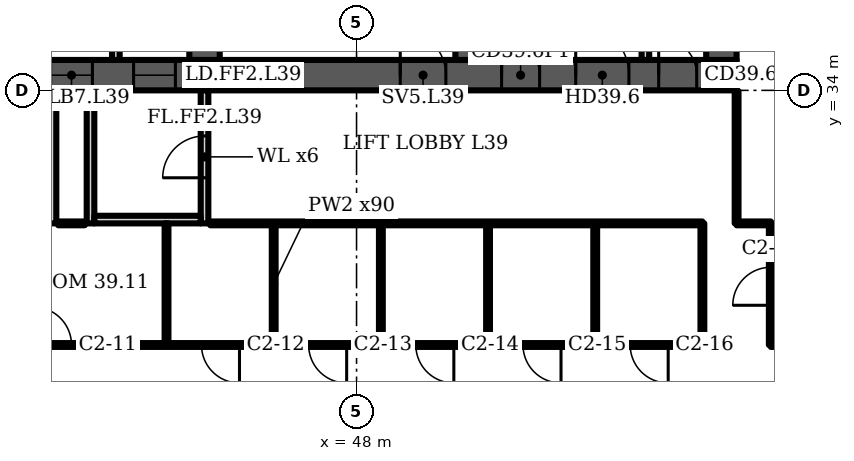
"""IFC4 building model, lengths in metres.
Left out: names, types, materials, properties, quantities, classifications, styles, units other than length and angle.
Written with IfcOpenShell. Run it as: python <this file> out.ifc"""

import sys

from ifc_helpers import new_model, si_unit, direction, frame, frame_2d, origin, place, context, subcontext, project, spatial, polyline, rectangle, outline, extrude, element, fill, save


model = new_model("IFC4")
c1 = context("Model", 3, precision=1e-05, world=origin(), true_north=direction((0.0, 1.0)))
c2 = subcontext(c1, "Body", "Model", "MODEL_VIEW")
j1 = project(units=[si_unit("LENGTHUNIT", "METRE"), si_unit("PLANEANGLEUNIT", "RADIAN")], contexts=[c1])
p1 = place(None, origin())
s1 = spatial("IfcSite", under=j1, at=p1, CompositionType="ELEMENT")
p2 = place(p1, origin())
s2 = spatial("IfcBuilding", under=s1, at=p2, CompositionType="ELEMENT")
p3 = place(p2, frame((0.0, 0.0, 162.7)))
s3 = spatial("IfcBuildingStorey", under=s2, at=p3, CompositionType="ELEMENT", Elevation=162.7)
p4 = place(p3, frame((16.0, 34.4, 0.0), z_axis=(0.0, 0.0, 1.0), x_axis=(1.0, 0.0, 0.0)))
e1 = element("IfcWall", 1, at=p4, inside=s3, PredefinedType="SHEAR", context=c2, shape_type="SweptSolid", body=[
    extrude(rectangle(XDim=42.0, YDim=0.8, at=frame_2d((21.0, 0.0))), origin(), (0.0, 0.0, 1.0), 3.6),
])
p5 = place(p4, frame((1.75, 0.0, 0.0)))
e2 = element("IfcOpeningElement", 2, at=p5, cuts=e1, PredefinedType="OPENING", context=c2, shape_type="SweptSolid", body=[
    extrude(rectangle(XDim=1.0, YDim=2.1, at=frame_2d((0.5, 1.05))), frame((0.0, 0.41, 0.0), z_axis=(0.0, -1.0, 0.0), x_axis=(1.0, 0.0, 0.0)), (0.0, 0.0, 1.0), 0.82),
])
p6 = place(p4, frame((4.65, 0.0, 0.0)))
e3 = element("IfcOpeningElement", 3, at=p6, cuts=e1, PredefinedType="OPENING", context=c2, shape_type="SweptSolid", body=[
    extrude(rectangle(XDim=1.0, YDim=2.1, at=frame_2d((0.5, 1.05))), frame((0.0, 0.41, 0.0), z_axis=(0.0, -1.0, 0.0), x_axis=(1.0, 0.0, 0.0)), (0.0, 0.0, 1.0), 0.82),
])
p7 = place(p4, frame((7.65, 0.0, 0.0)))
e4 = element("IfcOpeningElement", 4, at=p7, cuts=e1, PredefinedType="OPENING", context=c2, shape_type="SweptSolid", body=[
    extrude(rectangle(XDim=1.2, YDim=2.1, at=frame_2d((0.6, 1.05))), frame((0.0, 0.41, 0.0), z_axis=(0.0, -1.0, 0.0), x_axis=(1.0, 0.0, 0.0)), (0.0, 0.0, 1.0), 0.82),
])
p8 = place(p4, frame((14.767, 0.0, 0.0)))
e5 = element("IfcOpeningElement", 5, at=p8, cuts=e1, PredefinedType="OPENING", context=c2, shape_type="SweptSolid", body=[
    extrude(rectangle(XDim=1.1, YDim=2.1, at=frame_2d((0.55, 1.05))), frame((0.0, 0.41, 0.0), z_axis=(0.0, -1.0, 0.0), x_axis=(1.0, 0.0, 0.0)), (0.0, 0.0, 1.0), 0.82),
])
p9 = place(p4, frame((19.133, 0.0, 0.0)))
e6 = element("IfcOpeningElement", 6, at=p9, cuts=e1, PredefinedType="OPENING", context=c2, shape_type="SweptSolid", body=[
    extrude(rectangle(XDim=1.1, YDim=2.1, at=frame_2d((0.55, 1.05))), frame((0.0, 0.41, 0.0), z_axis=(0.0, -1.0, 0.0), x_axis=(1.0, 0.0, 0.0)), (0.0, 0.0, 1.0), 0.82),
])
p10 = place(p4, frame((16.8, 0.0, 0.0)))
e7 = element("IfcOpeningElement", 7, at=p10, cuts=e1, PredefinedType="OPENING", context=c2, shape_type="SweptSolid", body=[
    extrude(rectangle(XDim=1.4, YDim=2.1, at=frame_2d((0.7, 1.05))), frame((0.0, 0.41, 0.0), z_axis=(0.0, -1.0, 0.0), x_axis=(1.0, 0.0, 0.0)), (0.0, 0.0, 1.0), 0.82),
])
p11 = place(p4, frame((21.767, 0.0, 0.0)))
e8 = element("IfcOpeningElement", 8, at=p11, cuts=e1, PredefinedType="OPENING", context=c2, shape_type="SweptSolid", body=[
    extrude(rectangle(XDim=1.1, YDim=2.1, at=frame_2d((0.55, 1.05))), frame((0.0, 0.41, 0.0), z_axis=(0.0, -1.0, 0.0), x_axis=(1.0, 0.0, 0.0)), (0.0, 0.0, 1.0), 0.82),
])
p12 = place(p4, frame((23.95, 0.0, 0.0)))
e9 = element("IfcOpeningElement", 9, at=p12, cuts=e1, PredefinedType="OPENING", context=c2, shape_type="SweptSolid", body=[
    extrude(rectangle(XDim=1.1, YDim=2.1, at=frame_2d((0.55, 1.05))), frame((0.0, 0.41, 0.0), z_axis=(0.0, -1.0, 0.0), x_axis=(1.0, 0.0, 0.0)), (0.0, 0.0, 1.0), 0.82),
])
p13 = place(p4, frame((26.133, 0.0, 0.0)))
e10 = element("IfcOpeningElement", 10, at=p13, cuts=e1, PredefinedType="OPENING", context=c2, shape_type="SweptSolid", body=[
    extrude(rectangle(XDim=1.1, YDim=2.1, at=frame_2d((0.55, 1.05))), frame((0.0, 0.41, 0.0), z_axis=(0.0, -1.0, 0.0), x_axis=(1.0, 0.0, 0.0)), (0.0, 0.0, 1.0), 0.82),
])
p14 = place(p4, frame((33.15, 0.0, 0.0)))
e11 = element("IfcOpeningElement", 11, at=p14, cuts=e1, PredefinedType="OPENING", context=c2, shape_type="SweptSolid", body=[
    extrude(rectangle(XDim=1.2, YDim=2.1, at=frame_2d((0.6, 1.05))), frame((0.0, 0.41, 0.0), z_axis=(0.0, -1.0, 0.0), x_axis=(1.0, 0.0, 0.0)), (0.0, 0.0, 1.0), 0.82),
])
p15 = place(p4, frame((35.817, 0.0, 0.0)))
e12 = element("IfcOpeningElement", 12, at=p15, cuts=e1, PredefinedType="OPENING", context=c2, shape_type="SweptSolid", body=[
    extrude(rectangle(XDim=1.0, YDim=2.1, at=frame_2d((0.5, 1.05))), frame((0.0, 0.41, 0.0), z_axis=(0.0, -1.0, 0.0), x_axis=(1.0, 0.0, 0.0)), (0.0, 0.0, 1.0), 0.82),
])
p16 = place(p4, frame((39.95, 0.0, 0.0)))
e13 = element("IfcOpeningElement", 13, at=p16, cuts=e1, PredefinedType="OPENING", context=c2, shape_type="SweptSolid", body=[
    extrude(rectangle(XDim=1.0, YDim=2.1, at=frame_2d((0.5, 1.05))), frame((0.0, 0.41, 0.0), z_axis=(0.0, -1.0, 0.0), x_axis=(1.0, 0.0, 0.0)), (0.0, 0.0, 1.0), 0.82),
])
p17 = place(p4, frame((37.767, 0.0, 0.0)))
e14 = element("IfcOpeningElement", 14, at=p17, cuts=e1, PredefinedType="OPENING", context=c2, shape_type="SweptSolid", body=[
    extrude(rectangle(XDim=1.4, YDim=2.1, at=frame_2d((0.7, 1.05))), frame((0.0, 0.41, 0.0), z_axis=(0.0, -1.0, 0.0), x_axis=(1.0, 0.0, 0.0)), (0.0, 0.0, 1.0), 0.82),
])
p18 = place(p3, frame((44.0, 34.8, 0.0), z_axis=(0.0, 0.0, 1.0), x_axis=(0.0, 1.0, 0.0)))
e15 = element("IfcWall", 15, at=p18, inside=s3, PredefinedType="SHEAR", context=c2, shape_type="SweptSolid", body=[
    extrude(rectangle(XDim=14.374, YDim=0.8, at=frame_2d((7.187, 0.0))), origin(), (0.0, 0.0, 1.0), 3.6),
])
p19 = place(p18, frame((11.312, 0.0, 0.0)))
e16 = element("IfcOpeningElement", 16, at=p19, cuts=e15, PredefinedType="OPENING", context=c2, shape_type="SweptSolid", body=[
    extrude(rectangle(XDim=1.0, YDim=2.1, at=frame_2d((0.5, 1.05))), frame((0.0, 0.41, 0.0), z_axis=(0.0, -1.0, 0.0), x_axis=(1.0, 0.0, 0.0)), (0.0, 0.0, 1.0), 0.82),
])
p20 = place(p18, frame((3.6, 0.0, 0.0)))
e17 = element("IfcOpeningElement", 17, at=p20, cuts=e15, PredefinedType="OPENING", context=c2, shape_type="SweptSolid", body=[
    extrude(rectangle(XDim=1.1, YDim=2.1, at=frame_2d((0.55, 1.05))), frame((0.0, 0.41, 0.0), z_axis=(0.0, -1.0, 0.0), x_axis=(1.0, 0.0, 0.0)), (0.0, 0.0, 1.0), 0.82),
])
p21 = place(p3, frame((51.0, 34.8, 0.0), z_axis=(0.0, 0.0, 1.0), x_axis=(0.0, 1.0, 0.0)))
e18 = element("IfcWall", 18, at=p21, inside=s3, PredefinedType="SHEAR", context=c2, shape_type="SweptSolid", body=[
    extrude(rectangle(XDim=13.762, YDim=0.8, at=frame_2d((6.881, 0.0))), origin(), (0.0, 0.0, 1.0), 3.6),
])
p22 = place(p21, frame((3.6, 0.0, 0.0)))
e19 = element("IfcOpeningElement", 19, at=p22, cuts=e18, PredefinedType="OPENING", context=c2, shape_type="SweptSolid", body=[
    extrude(rectangle(XDim=1.1, YDim=2.1, at=frame_2d((0.55, 1.05))), frame((0.0, 0.41, 0.0), z_axis=(0.0, -1.0, 0.0), x_axis=(1.0, 0.0, 0.0)), (0.0, 0.0, 1.0), 0.82),
])
p23 = place(p3, frame((57.6, 34.8, 0.0), z_axis=(0.0, 0.0, 1.0), x_axis=(0.0, 1.0, 0.0)))
e20 = element("IfcWall", 20, at=p23, inside=s3, PredefinedType="SHEAR", context=c2, shape_type="SweptSolid", body=[
    extrude(rectangle(XDim=13.184, YDim=0.8, at=frame_2d((6.592, 0.0))), origin(), (0.0, 0.0, 1.0), 3.6),
])
p24 = place(p3, frame((0.0, 0.0, -0.0)))
e21 = element("IfcWall", 21, at=p24, inside=s3, PredefinedType="PARTITIONING", context=c2, shape_type="SweptSolid", body=[
    extrude(outline(polyline([(41.567, 37.1), (39.433, 37.1), (39.433, 34.8), (39.233, 34.8), (39.233, 37.65), (37.4, 37.65), (37.4, 37.85), (39.233, 37.85), (39.433, 37.85), (39.433, 37.3), (41.567, 37.3), (41.567, 37.55), (41.767, 37.55), (43.6, 37.55), (43.6, 37.35), (41.767, 37.35), (41.767, 34.8), (41.567, 34.8), (41.567, 37.1)])), origin(), (0.0, 0.0, 1.0), 3.2),
])
p25 = place(p3, frame((0.0, 0.0, -0.0)))
e22 = element("IfcWall", 22, at=p25, inside=s3, PredefinedType="PARTITIONING", context=c2, shape_type="SweptSolid", body=[
    extrude(outline(polyline([(53.233, 34.8), (53.233, 37.3), (53.433, 37.3), (53.433, 34.8), (53.233, 34.8)])), origin(), (0.0, 0.0, 1.0), 3.2),
])
p26 = place(p3, frame((0.0, 0.0, -0.0)))
e23 = element("IfcWall", 23, at=p26, inside=s3, PredefinedType="PARTITIONING", context=c2, shape_type="SweptSolid", body=[
    extrude(outline(polyline([(55.5, 34.8), (55.5, 37.3), (55.7, 37.3), (55.7, 34.8), (55.5, 34.8)])), origin(), (0.0, 0.0, 1.0), 3.2),
])
for number, where, z_axis, x_axis in (
    (24, (40.0, 30.5, 0.0), (0.0, 0.0, 1.0), (0.0, 1.0, 0.0)),
    (25, (41.0, 30.5, 0.0), (0.0, 0.0, 1.0), (0.0, 1.0, 0.0)),
):
    element("IfcWall", number, at=place(p3, frame(where, z_axis=z_axis, x_axis=x_axis)), inside=s3, PredefinedType="PARTITIONING", context=c2, shape_type="SweptSolid", body=[
        extrude(rectangle(XDim=3.5, YDim=0.2, at=frame_2d((1.75, 0.0))), origin(), (0.0, 0.0, 1.0), 3.2),
    ])
p27 = place(p3, frame((44.0, 30.5, 0.0), z_axis=(0.0, 0.0, 1.0), x_axis=(0.0, 1.0, 0.0)))
e26 = element("IfcWall", 26, at=p27, inside=s3, PredefinedType="PARTITIONING", context=c2, shape_type="SweptSolid", body=[
    extrude(rectangle(XDim=3.5, YDim=0.2, at=frame_2d((1.75, 0.0))), origin(), (0.0, 0.0, 1.0), 3.2),
])
p28 = place(p27, frame((1.2, 0.0, 0.0)))
e27 = element("IfcOpeningElement", 27, at=p28, cuts=e26, PredefinedType="OPENING", context=c2, shape_type="SweptSolid", body=[
    extrude(rectangle(XDim=1.1, YDim=2.1, at=frame_2d((0.55, 1.05))), frame((0.0, 0.11, 0.0), z_axis=(0.0, -1.0, 0.0), x_axis=(1.0, 0.0, 0.0)), (0.0, 0.0, 1.0), 0.22),
])
p29 = place(p3, frame((41.1, 30.6, 0.0), z_axis=(0.0, 0.0, 1.0), x_axis=(1.0, 0.0, 0.0)))
e28 = element("IfcWall", 28, at=p29, inside=s3, PredefinedType="PARTITIONING", context=c2, shape_type="SweptSolid", body=[
    extrude(rectangle(XDim=2.8, YDim=0.2, at=frame_2d((1.4, 0.0))), origin(), (0.0, 0.0, 1.0), 3.2),
])
p30 = place(p3, frame((23.2, 27.3, 0.0), z_axis=(0.0, 0.0, 1.0), x_axis=(1.0, 0.0, 0.0)))
e29 = element("IfcWall", 29, at=p30, inside=s3, PredefinedType="PARTITIONING", context=c2, shape_type="SweptSolid", body=[
    extrude(rectangle(XDim=33.9, YDim=0.1, at=frame_2d((16.95, 0.0))), origin(), (0.0, 0.0, 1.0), 3.2),
])
p31 = place(p30, frame((16.3, 0.0, 0.0)))
e30 = element("IfcOpeningElement", 30, at=p31, cuts=e29, PredefinedType="OPENING", context=c2, shape_type="SweptSolid", body=[
    extrude(rectangle(XDim=1.0, YDim=2.1, at=frame_2d((0.5, 1.05))), frame((0.0, 0.06, 0.0), z_axis=(0.0, -1.0, 0.0), x_axis=(1.0, 0.0, 0.0)), (0.0, 0.0, 1.0), 0.12),
])
p32 = place(p30, frame((20.72, 0.0, 0.0)))
e31 = element("IfcOpeningElement", 31, at=p32, cuts=e29, PredefinedType="OPENING", context=c2, shape_type="SweptSolid", body=[
    extrude(rectangle(XDim=1.0, YDim=2.1, at=frame_2d((0.5, 1.05))), frame((0.0, 0.06, 0.0), z_axis=(0.0, -1.0, 0.0), x_axis=(1.0, 0.0, 0.0)), (0.0, 0.0, 1.0), 0.12),
])
p33 = place(p30, frame((23.54, 0.0, 0.0)))
e32 = element("IfcOpeningElement", 32, at=p33, cuts=e29, PredefinedType="OPENING", context=c2, shape_type="SweptSolid", body=[
    extrude(rectangle(XDim=1.0, YDim=2.1, at=frame_2d((0.5, 1.05))), frame((0.0, 0.06, 0.0), z_axis=(0.0, -1.0, 0.0), x_axis=(1.0, 0.0, 0.0)), (0.0, 0.0, 1.0), 0.12),
])
p34 = place(p30, frame((26.36, 0.0, 0.0)))
e33 = element("IfcOpeningElement", 33, at=p34, cuts=e29, PredefinedType="OPENING", context=c2, shape_type="SweptSolid", body=[
    extrude(rectangle(XDim=1.0, YDim=2.1, at=frame_2d((0.5, 1.05))), frame((0.0, 0.06, 0.0), z_axis=(0.0, -1.0, 0.0), x_axis=(1.0, 0.0, 0.0)), (0.0, 0.0, 1.0), 0.12),
])
p35 = place(p30, frame((29.18, 0.0, 0.0)))
e34 = element("IfcOpeningElement", 34, at=p35, cuts=e29, PredefinedType="OPENING", context=c2, shape_type="SweptSolid", body=[
    extrude(rectangle(XDim=1.0, YDim=2.1, at=frame_2d((0.5, 1.05))), frame((0.0, 0.06, 0.0), z_axis=(0.0, -1.0, 0.0), x_axis=(1.0, 0.0, 0.0)), (0.0, 0.0, 1.0), 0.12),
])
p36 = place(p30, frame((32.0, 0.0, 0.0)))
e35 = element("IfcOpeningElement", 35, at=p36, cuts=e29, PredefinedType="OPENING", context=c2, shape_type="SweptSolid", body=[
    extrude(rectangle(XDim=1.0, YDim=2.1, at=frame_2d((0.5, 1.05))), frame((0.0, 0.06, 0.0), z_axis=(0.0, -1.0, 0.0), x_axis=(1.0, 0.0, 0.0)), (0.0, 0.0, 1.0), 0.12),
])
for number, where, z_axis, x_axis in (
    (36, (43.0, 27.3, 0.0), (0.0, 0.0, 1.0), (0.0, 1.0, 0.0)),
    (37, (45.82, 27.3, 0.0), (0.0, 0.0, 1.0), (0.0, 1.0, 0.0)),
    (38, (48.64, 27.3, 0.0), (0.0, 0.0, 1.0), (0.0, 1.0, 0.0)),
    (39, (51.46, 27.3, 0.0), (0.0, 0.0, 1.0), (0.0, 1.0, 0.0)),
    (40, (54.28, 27.3, 0.0), (0.0, 0.0, 1.0), (0.0, 1.0, 0.0)),
    (41, (57.1, 27.3, 0.0), (0.0, 0.0, 1.0), (0.0, 1.0, 0.0)),
):
    element("IfcWall", number, at=place(p3, frame(where, z_axis=z_axis, x_axis=x_axis)), inside=s3, PredefinedType="PARTITIONING", context=c2, shape_type="SweptSolid", body=[
        extrude(rectangle(XDim=3.2, YDim=0.1, at=frame_2d((1.6, 0.0))), origin(), (0.0, 0.0, 1.0), 3.2),
    ])
p37 = place(p3, frame((58.0, 30.5, 0.0), z_axis=(0.0, 0.0, 1.0), x_axis=(0.0, 1.0, 0.0)))
e42 = element("IfcWall", 42, at=p37, inside=s3, PredefinedType="PARTITIONING", context=c2, shape_type="SweptSolid", body=[
    extrude(rectangle(XDim=3.48, YDim=0.1, at=frame_2d((1.74, 0.0))), origin(), (0.0, 0.0, 1.0), 3.2),
])
p38 = place(p3, frame((58.0, 30.5, 0.0), z_axis=(0.0, 0.0, 1.0), x_axis=(1.0, 0.0, 0.0)))
e43 = element("IfcWall", 43, at=p38, inside=s3, PredefinedType="PARTITIONING", context=c2, shape_type="SweptSolid", body=[
    extrude(rectangle(XDim=0.9, YDim=0.1, at=frame_2d((0.45, 0.0))), origin(), (0.0, 0.0, 1.0), 3.2),
])
p39 = place(p3, frame((58.9, 27.3, 0.0), z_axis=(0.0, 0.0, 1.0), x_axis=(0.0, 1.0, 0.0)))
e44 = element("IfcWall", 44, at=p39, inside=s3, PredefinedType="PARTITIONING", context=c2, shape_type="SweptSolid", body=[
    extrude(rectangle(XDim=3.2, YDim=0.1, at=frame_2d((1.6, 0.0))), origin(), (0.0, 0.0, 1.0), 3.2),
])
p40 = place(p39, frame((1.045, 0.0, 0.0)))
e45 = element("IfcOpeningElement", 45, at=p40, cuts=e44, PredefinedType="OPENING", context=c2, shape_type="SweptSolid", body=[
    extrude(rectangle(XDim=1.0, YDim=2.1, at=frame_2d((0.5, 1.05))), frame((0.0, 0.06, 0.0), z_axis=(0.0, -1.0, 0.0), x_axis=(1.0, 0.0, 0.0)), (0.0, 0.0, 1.0), 0.12),
])
p41 = place(p3, frame((58.9, 27.3, 0.0), z_axis=(0.0, 0.0, 1.0), x_axis=(1.0, 0.0, 0.0)))
e46 = element("IfcWall", 46, at=p41, inside=s3, PredefinedType="PARTITIONING", context=c2, shape_type="SweptSolid", body=[
    extrude(rectangle(XDim=4.555, YDim=0.1, at=frame_2d((2.278, 0.0))), origin(), (0.0, 0.0, 1.0), 3.2),
])
p42 = place(p3, frame((40.15, 30.5, 0.0), z_axis=(0.0, 0.0, 1.0), x_axis=(1.0, 0.0, 0.0)))
e47 = element("IfcWall", 47, at=p42, inside=s3, PredefinedType="PARTITIONING", context=c2, shape_type="SweptSolid", body=[
    extrude(rectangle(XDim=0.7, YDim=0.1, at=frame_2d((0.35, 0.0))), origin(), (0.0, 0.0, 1.0), 3.2),
])
p43 = place(p3, frame((44.15, 30.5, 0.0), z_axis=(0.0, 0.0, 1.0), x_axis=(1.0, 0.0, 0.0)))
e48 = element("IfcWall", 48, at=p43, inside=s3, PredefinedType="PARTITIONING", context=c2, shape_type="SweptSolid", body=[
    extrude(rectangle(XDim=12.95, YDim=0.1, at=frame_2d((6.475, 0.0))), origin(), (0.0, 0.0, 1.0), 3.2),
])
p44 = place(p12, origin())
e49 = element("IfcDoor", 49, at=p44, inside=s3, OperationType="DOUBLE_DOOR_SLIDING", PredefinedType="DOOR", context=c2, shape_type="SweptSolid", body=[
    extrude(rectangle(XDim=1.1, YDim=2.1, at=frame_2d((0.55, 1.05))), frame((0.0, 0.025, 0.0), z_axis=(0.0, -1.0, 0.0), x_axis=(1.0, 0.0, 0.0)), (0.0, 0.0, 1.0), 0.05),
])
fill(e9, e49)
p45 = place(p13, origin())
e50 = element("IfcDoor", 50, at=p45, inside=s3, OperationType="DOUBLE_DOOR_SLIDING", PredefinedType="DOOR", context=c2, shape_type="SweptSolid", body=[
    extrude(rectangle(XDim=1.1, YDim=2.1, at=frame_2d((0.55, 1.05))), frame((0.0, 0.025, 0.0), z_axis=(0.0, -1.0, 0.0), x_axis=(1.0, 0.0, 0.0)), (0.0, 0.0, 1.0), 0.05),
])
fill(e10, e50)
p46 = place(p14, origin())
e51 = element("IfcDoor", 51, at=p46, inside=s3, OperationType="SINGLE_SWING_LEFT", PredefinedType="DOOR", context=c2, shape_type="SweptSolid", body=[
    extrude(rectangle(XDim=1.2, YDim=2.1, at=frame_2d((0.6, 1.05))), frame((0.0, 0.025, 0.0), z_axis=(0.0, -1.0, 0.0), x_axis=(1.0, 0.0, 0.0)), (0.0, 0.0, 1.0), 0.05),
])
fill(e11, e51)
p47 = place(p15, origin())
e52 = element("IfcDoor", 52, at=p47, inside=s3, OperationType="SINGLE_SWING_LEFT", PredefinedType="DOOR", context=c2, shape_type="SweptSolid", body=[
    extrude(rectangle(XDim=1.0, YDim=2.1, at=frame_2d((0.5, 1.05))), frame((0.0, 0.4, 0.0), z_axis=(0.0, -1.0, 0.0), x_axis=(1.0, 0.0, 0.0)), (0.0, 0.0, 1.0), 0.8),
])
fill(e12, e52)
p48 = place(p16, origin())
e53 = element("IfcDoor", 53, at=p48, inside=s3, OperationType="SINGLE_SWING_LEFT", PredefinedType="DOOR", context=c2, shape_type="SweptSolid", body=[
    extrude(rectangle(XDim=1.0, YDim=2.1, at=frame_2d((0.5, 1.05))), frame((0.0, 0.4, 0.0), z_axis=(0.0, -1.0, 0.0), x_axis=(1.0, 0.0, 0.0)), (0.0, 0.0, 1.0), 0.8),
])
fill(e13, e53)
p49 = place(p17, origin())
e54 = element("IfcDoor", 54, at=p49, inside=s3, OperationType="DOUBLE_DOOR_SINGLE_SWING", PredefinedType="DOOR", context=c2, shape_type="SweptSolid", body=[
    extrude(rectangle(XDim=1.4, YDim=2.1, at=frame_2d((0.7, 1.05))), frame((0.0, 0.025, 0.0), z_axis=(0.0, -1.0, 0.0), x_axis=(1.0, 0.0, 0.0)), (0.0, 0.0, 1.0), 0.05),
])
fill(e14, e54)
p50 = place(p28, origin())
e55 = element("IfcDoor", 55, at=p50, inside=s3, OperationType="SINGLE_SWING_LEFT", PredefinedType="DOOR", context=c2, shape_type="SweptSolid", body=[
    extrude(rectangle(XDim=1.1, YDim=2.1, at=frame_2d((0.55, 1.05))), frame((0.0, 0.025, 0.0), z_axis=(0.0, -1.0, 0.0), x_axis=(1.0, 0.0, 0.0)), (0.0, 0.0, 1.0), 0.05),
])
fill(e27, e55)
p51 = place(p31, origin())
e56 = element("IfcDoor", 56, at=p51, inside=s3, OperationType="SINGLE_SWING_LEFT", PredefinedType="DOOR", context=c2, shape_type="SweptSolid", body=[
    extrude(rectangle(XDim=1.0, YDim=2.1, at=frame_2d((0.5, 1.05))), frame((0.0, 0.025, 0.0), z_axis=(0.0, -1.0, 0.0), x_axis=(1.0, 0.0, 0.0)), (0.0, 0.0, 1.0), 0.05),
])
fill(e30, e56)
p52 = place(p32, origin())
e57 = element("IfcDoor", 57, at=p52, inside=s3, OperationType="SINGLE_SWING_RIGHT", PredefinedType="DOOR", context=c2, shape_type="SweptSolid", body=[
    extrude(rectangle(XDim=1.0, YDim=2.1, at=frame_2d((0.5, 1.05))), frame((0.0, 0.025, 0.0), z_axis=(0.0, -1.0, 0.0), x_axis=(1.0, 0.0, 0.0)), (0.0, 0.0, 1.0), 0.05),
])
fill(e31, e57)
p53 = place(p33, origin())
e58 = element("IfcDoor", 58, at=p53, inside=s3, OperationType="SINGLE_SWING_RIGHT", PredefinedType="DOOR", context=c2, shape_type="SweptSolid", body=[
    extrude(rectangle(XDim=1.0, YDim=2.1, at=frame_2d((0.5, 1.05))), frame((0.0, 0.025, 0.0), z_axis=(0.0, -1.0, 0.0), x_axis=(1.0, 0.0, 0.0)), (0.0, 0.0, 1.0), 0.05),
])
fill(e32, e58)
p54 = place(p34, origin())
e59 = element("IfcDoor", 59, at=p54, inside=s3, OperationType="SINGLE_SWING_RIGHT", PredefinedType="DOOR", context=c2, shape_type="SweptSolid", body=[
    extrude(rectangle(XDim=1.0, YDim=2.1, at=frame_2d((0.5, 1.05))), frame((0.0, 0.025, 0.0), z_axis=(0.0, -1.0, 0.0), x_axis=(1.0, 0.0, 0.0)), (0.0, 0.0, 1.0), 0.05),
])
fill(e33, e59)
p55 = place(p35, origin())
e60 = element("IfcDoor", 60, at=p55, inside=s3, OperationType="SINGLE_SWING_RIGHT", PredefinedType="DOOR", context=c2, shape_type="SweptSolid", body=[
    extrude(rectangle(XDim=1.0, YDim=2.1, at=frame_2d((0.5, 1.05))), frame((0.0, 0.025, 0.0), z_axis=(0.0, -1.0, 0.0), x_axis=(1.0, 0.0, 0.0)), (0.0, 0.0, 1.0), 0.05),
])
fill(e34, e60)
p56 = place(p36, origin())
e61 = element("IfcDoor", 61, at=p56, inside=s3, OperationType="SINGLE_SWING_RIGHT", PredefinedType="DOOR", context=c2, shape_type="SweptSolid", body=[
    extrude(rectangle(XDim=1.0, YDim=2.1, at=frame_2d((0.5, 1.05))), frame((0.0, 0.025, 0.0), z_axis=(0.0, -1.0, 0.0), x_axis=(1.0, 0.0, 0.0)), (0.0, 0.0, 1.0), 0.05),
])
fill(e35, e61)
p57 = place(p40, origin())
e62 = element("IfcDoor", 62, at=p57, inside=s3, OperationType="SINGLE_SWING_LEFT", PredefinedType="DOOR", context=c2, shape_type="SweptSolid", body=[
    extrude(rectangle(XDim=1.0, YDim=2.1, at=frame_2d((0.5, 1.05))), frame((0.0, 0.025, 0.0), z_axis=(0.0, -1.0, 0.0), x_axis=(1.0, 0.0, 0.0)), (0.0, 0.0, 1.0), 0.05),
])
fill(e45, e62)
save(model, sys.argv[1])
